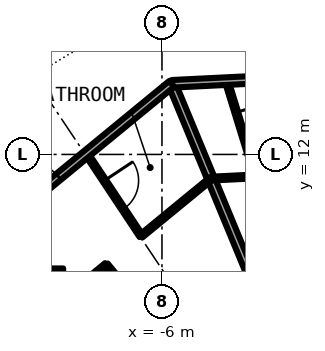
"""IFC4 building model, lengths in metres.
Left out: names, types, materials, properties, quantities, classifications, styles, units other than length and angle.
Written with IfcOpenShell. Run it as: python <this file> out.ifc"""

import sys

from ifc_helpers import new_model, si_unit, direction, frame, frame_2d, origin, place, context, subcontext, project, spatial, rectangle, extrude, element, fill, save


model = new_model("IFC4")
c1 = context("Model", 3, precision=1e-05, world=origin(), true_north=direction((0.0, 1.0)))
c2 = subcontext(c1, "Body", "Model", "MODEL_VIEW")
j1 = project(units=[si_unit("LENGTHUNIT", "METRE"), si_unit("PLANEANGLEUNIT", "RADIAN")], contexts=[c1])
p1 = place(None, origin())
s1 = spatial("IfcSite", under=j1, at=p1, CompositionType="ELEMENT")
p2 = place(p1, origin())
s2 = spatial("IfcBuilding", under=s1, at=p2, CompositionType="ELEMENT")
p3 = place(p2, frame((0.0, 0.0, 237.1)))
s3 = spatial("IfcBuildingStorey", under=s2, at=p3, CompositionType="ELEMENT", Elevation=237.1)
p4 = place(p3, frame((-8.6, 8.8, 0.0), z_axis=(0.0, 0.0, 1.0), x_axis=(-1.0, 0.0, 0.0)))
e1 = element("IfcWall", 1, at=p4, inside=s3, PredefinedType="SHEAR", context=c2, shape_type="SweptSolid", body=[
    extrude(rectangle(XDim=13.4, YDim=0.4, at=frame_2d((6.7, 0.0))), origin(), (0.0, 0.0, 1.0), 3.05),
])
p5 = place(p4, frame((11.275, 0.0, 0.0)))
e2 = element("IfcOpeningElement", 2, at=p5, cuts=e1, PredefinedType="OPENING", context=c2, shape_type="SweptSolid", body=[
    extrude(rectangle(XDim=1.2, YDim=2.3, at=frame_2d((0.6, 1.15))), frame((0.0, 0.21, 0.0), z_axis=(0.0, -1.0, 0.0), x_axis=(1.0, 0.0, 0.0)), (0.0, 0.0, 1.0), 0.42),
])
p6 = place(p3, frame((-5.742, 13.857, 0.0), z_axis=(0.0, 0.0, 1.0), x_axis=(0.382275765368, -0.924048288355, 0.0)))
e3 = element("IfcWall", 3, at=p6, inside=s3, PredefinedType="PARTITIONING", context=c2, shape_type="SweptSolid", body=[
    extrude(rectangle(XDim=7.28, YDim=0.2, at=frame_2d((3.64, 0.0))), origin(), (0.0, 0.0, 1.0), 2.7),
])
p7 = place(p3, frame((-7.984, 12.017, 0.0), z_axis=(0.0, 0.0, 1.0), x_axis=(0.553289146762, -0.832989267683, 0.0)))
e4 = element("IfcWall", 4, at=p7, inside=s3, PredefinedType="PARTITIONING", context=c2, shape_type="SweptSolid", body=[
    extrude(rectangle(XDim=2.597, YDim=0.1, at=frame_2d((1.298, 0.0))), origin(), (0.0, 0.0, 1.0), 2.7),
])
p8 = place(p7, frame((0.848, 0.0, 0.0)))
e5 = element("IfcOpeningElement", 5, at=p8, cuts=e4, PredefinedType="OPENING", context=c2, shape_type="SweptSolid", body=[
    extrude(rectangle(XDim=0.9, YDim=2.3, at=frame_2d((0.45, 1.15))), frame((0.0, 0.06, 0.0), z_axis=(0.0, -1.0, 0.0), x_axis=(1.0, 0.0, 0.0)), (0.0, 0.0, 1.0), 0.12),
])
p9 = place(p3, frame((-7.467, 9.099, 0.0), z_axis=(0.0, 0.0, 1.0), x_axis=(0.634313840507, -0.773075644256, 0.0)))
e6 = element("IfcWall", 6, at=p9, inside=s3, PredefinedType="PARTITIONING", context=c2, shape_type="SweptSolid", body=[
    extrude(rectangle(XDim=4.05, YDim=0.1, at=frame_2d((2.025, 0.0))), origin(), (0.0, 0.0, 1.0), 2.7),
])
p10 = place(p9, frame((1.575, 0.0, 0.0)))
e7 = element("IfcOpeningElement", 7, at=p10, cuts=e6, PredefinedType="OPENING", context=c2, shape_type="SweptSolid", body=[
    extrude(rectangle(XDim=0.9, YDim=2.3, at=frame_2d((0.45, 1.15))), frame((0.0, 0.06, 0.0), z_axis=(0.0, -1.0, 0.0), x_axis=(1.0, 0.0, 0.0)), (0.0, 0.0, 1.0), 0.12),
])
p11 = place(p3, frame((-4.298, 13.929, 0.0), z_axis=(0.0, 0.0, 1.0), x_axis=(0.294733203916, -0.95557958251, 0.0)))
e8 = element("IfcWall", 8, at=p11, inside=s3, PredefinedType="PARTITIONING", context=c2, shape_type="SweptSolid", body=[
    extrude(rectangle(XDim=2.623, YDim=0.1, at=frame_2d((1.312, 0.0))), origin(), (0.0, 0.0, 1.0), 2.7),
])
p12 = place(p11, frame((0.862, 0.0, 0.0)))
e9 = element("IfcOpeningElement", 9, at=p12, cuts=e8, PredefinedType="OPENING", context=c2, shape_type="SweptSolid", body=[
    extrude(rectangle(XDim=0.9, YDim=2.3, at=frame_2d((0.45, 1.15))), frame((0.0, 0.06, 0.0), z_axis=(0.0, -1.0, 0.0), x_axis=(1.0, 0.0, 0.0)), (0.0, 0.0, 1.0), 0.12),
])
p13 = place(p3, frame((-4.707, 11.364, 0.0), z_axis=(0.0, 0.0, 1.0), x_axis=(0.998798028825, 0.04901527941, 0.0)))
e10 = element("IfcWall", 10, at=p13, inside=s3, PredefinedType="PARTITIONING", context=c2, shape_type="SweptSolid", body=[
    extrude(rectangle(XDim=3.551, YDim=0.1, at=frame_2d((1.776, 0.0))), origin(), (0.0, 0.0, 1.0), 2.7),
])
p14 = place(p3, frame((-8.387, 8.344, 0.0), z_axis=(0.0, 0.0, 1.0), x_axis=(0.772869802794, 0.634564628646, 0.0)))
e11 = element("IfcWall", 11, at=p14, inside=s3, PredefinedType="PARTITIONING", context=c2, shape_type="SweptSolid", body=[
    extrude(rectangle(XDim=1.192, YDim=0.1, at=frame_2d((0.596, 0.0))), origin(), (0.0, 0.0, 1.0), 2.7),
])
p15 = place(p3, frame((-6.547, 9.854, 0.0), z_axis=(0.0, 0.0, 1.0), x_axis=(0.773033390712, 0.634365333893, 0.0)))
e12 = element("IfcWall", 12, at=p15, inside=s3, PredefinedType="PARTITIONING", context=c2, shape_type="SweptSolid", body=[
    extrude(rectangle(XDim=2.38, YDim=0.1, at=frame_2d((1.19, 0.0))), origin(), (0.0, 0.0, 1.0), 2.7),
])
p16 = place(p3, frame((-5.74, 13.858, 0.0), z_axis=(0.0, 0.0, 1.0), x_axis=(0.998789706874, 0.049184565079, 0.0)))
e13 = element("IfcWall", 13, at=p16, inside=s3, PredefinedType="PARTITIONING", context=c2, shape_type="SweptSolid", body=[
    extrude(rectangle(XDim=10.106, YDim=0.2, at=frame_2d((5.053, 0.0))), origin(), (0.0, 0.0, 1.0), 2.7),
])
p17 = place(p16, frame((5.274, 0.0, 0.0)))
e14 = element("IfcOpeningElement", 14, at=p17, cuts=e13, PredefinedType="OPENING", context=c2, shape_type="SweptSolid", body=[
    extrude(rectangle(XDim=1.0, YDim=2.3, at=frame_2d((0.5, 1.15))), frame((0.0, 0.11, 0.0), z_axis=(0.0, -1.0, 0.0), x_axis=(1.0, 0.0, 0.0)), (0.0, 0.0, 1.0), 0.22),
])
p18 = place(p3, frame((-10.228, 10.175, 0.0), z_axis=(0.0, 0.0, 1.0), x_axis=(0.772989261861, 0.634419105204, 0.0)))
e15 = element("IfcWall", 15, at=p18, inside=s3, PredefinedType="PARTITIONING", context=c2, shape_type="SweptSolid", body=[
    extrude(rectangle(XDim=5.803, YDim=0.2, at=frame_2d((2.902, 0.0))), origin(), (0.0, 0.0, 1.0), 2.7),
])
p19 = place(p18, frame((0.952, 0.0, 0.0)))
e16 = element("IfcOpeningElement", 16, at=p19, cuts=e15, PredefinedType="OPENING", context=c2, shape_type="SweptSolid", body=[
    extrude(rectangle(XDim=1.0, YDim=2.3, at=frame_2d((0.5, 1.15))), frame((0.0, 0.11, 0.0), z_axis=(0.0, -1.0, 0.0), x_axis=(1.0, 0.0, 0.0)), (0.0, 0.0, 1.0), 0.22),
])
p20 = place(p12, origin())
e17 = element("IfcDoor", 17, at=p20, inside=s3, OperationType="SINGLE_SWING_LEFT", PredefinedType="DOOR", context=c2, shape_type="SweptSolid", body=[
    extrude(rectangle(XDim=0.9, YDim=2.3, at=frame_2d((0.45, 1.15))), frame((0.0, 0.025, 0.0), z_axis=(0.0, -1.0, 0.0), x_axis=(1.0, 0.0, 0.0)), (0.0, 0.0, 1.0), 0.05),
])
fill(e9, e17)
p21 = place(p19, origin())
e18 = element("IfcDoor", 18, at=p21, inside=s3, OperationType="SINGLE_SWING_LEFT", PredefinedType="DOOR", context=c2, shape_type="SweptSolid", body=[
    extrude(rectangle(XDim=1.0, YDim=2.3, at=frame_2d((0.5, 1.15))), frame((0.0, 0.025, 0.0), z_axis=(0.0, -1.0, 0.0), x_axis=(1.0, 0.0, 0.0)), (0.0, 0.0, 1.0), 0.05),
])
fill(e16, e18)
p22 = place(p8, origin())
e19 = element("IfcDoor", 19, at=p22, inside=s3, OperationType="SINGLE_SWING_RIGHT", PredefinedType="DOOR", context=c2, shape_type="SweptSolid", body=[
    extrude(rectangle(XDim=0.9, YDim=2.3, at=frame_2d((0.45, 1.15))), frame((0.0, 0.025, 0.0), z_axis=(0.0, -1.0, 0.0), x_axis=(1.0, 0.0, 0.0)), (0.0, 0.0, 1.0), 0.05),
])
fill(e5, e19)
save(model, sys.argv[1])
